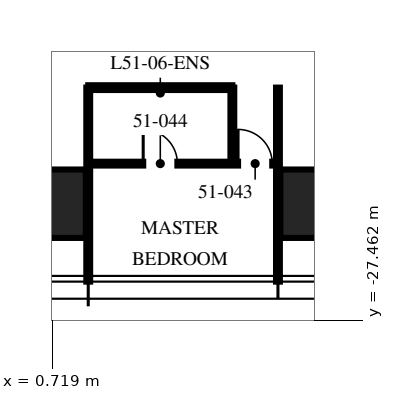
"""IFC4 building model, lengths in metres.
Left out: names, types, materials, properties, quantities, classifications, styles, units other than length and angle.
Written with IfcOpenShell. Run it as: python <this file> out.ifc"""

import sys

from ifc_helpers import new_model, si_unit, direction, frame, frame_2d, origin, origin_2d, place, context, subcontext, project, spatial, rectangle, hollow_rectangle, extrude, element, fill, save


model = new_model("IFC4")
c1 = context("Model", 3, precision=1e-05, world=origin(), true_north=direction((0.0, 1.0)))
c2 = subcontext(c1, "Body", "Model", "MODEL_VIEW")
j1 = project(units=[si_unit("LENGTHUNIT", "METRE"), si_unit("PLANEANGLEUNIT", "RADIAN")], contexts=[c1])
p1 = place(None, origin())
s1 = spatial("IfcSite", under=j1, at=p1, CompositionType="ELEMENT")
p2 = place(p1, origin())
s2 = spatial("IfcBuilding", under=s1, at=p2, CompositionType="ELEMENT")
p3 = place(p2, frame((0.0, 0.0, 207.0)))
s3 = spatial("IfcBuildingStorey", under=s2, at=p3, CompositionType="ELEMENT", Elevation=207.0)
for number, where, z_axis, x_axis in (
    (1, (8.32, -24.4, 0.0), (0.0, 0.0, 1.0), (1.0, 0.0, 0.0)),
    (2, (0.0, -24.4, 0.0), (0.0, 0.0, 1.0), (1.0, 0.0, 0.0)),
):
    element("IfcColumn", number, at=place(p3, frame(where, z_axis=z_axis, x_axis=x_axis)), inside=s3, PredefinedType="COLUMN", context=c2, shape_type="SweptSolid", body=[
        extrude(hollow_rectangle(XDim=3.2, YDim=1.8, WallThickness=0.2, at=origin_2d()), origin(), (0.0, 0.0, 1.0), 3.75),
    ])
for number, where, z_axis, x_axis in (
    (3, (1.664, -21.345, 0.0), (0.0, 0.0, 1.0), (0.0, -1.0, 0.0)),
    (4, (6.656, -21.345, 0.0), (0.0, 0.0, 1.0), (0.0, -1.0, 0.0)),
):
    element("IfcWall", number, at=place(p3, frame(where, z_axis=z_axis, x_axis=x_axis)), inside=s3, PredefinedType="PARTITIONING", context=c2, shape_type="SweptSolid", body=[
        extrude(rectangle(XDim=5.105, YDim=0.1, at=frame_2d((2.552, 0.0))), origin(), (0.0, 0.0, 1.0), 2.91),
    ])
p4 = place(p3, frame((1.664, -23.345, 0.0), z_axis=(0.0, 0.0, 1.0), x_axis=(1.0, 0.0, 0.0)))
e5 = element("IfcWall", 5, at=p4, inside=s3, PredefinedType="PARTITIONING", context=c2, shape_type="SweptSolid", body=[
    extrude(rectangle(XDim=4.992, YDim=0.1, at=frame_2d((2.496, 0.0))), origin(), (0.0, 0.0, 1.0), 2.81),
])
p5 = place(p4, frame((3.942, 0.0, 0.0)))
e6 = element("IfcOpeningElement", 6, at=p5, cuts=e5, PredefinedType="OPENING", context=c2, shape_type="SweptSolid", body=[
    extrude(rectangle(XDim=0.9, YDim=2.1, at=frame_2d((0.45, 1.05))), frame((0.0, 0.06, 0.0), z_axis=(0.0, -1.0, 0.0), x_axis=(1.0, 0.0, 0.0)), (0.0, 0.0, 1.0), 0.12),
])
p6 = place(p4, frame((1.446, 0.0, 0.0)))
e7 = element("IfcOpeningElement", 7, at=p6, cuts=e5, PredefinedType="OPENING", context=c2, shape_type="SweptSolid", body=[
    extrude(rectangle(XDim=0.9, YDim=2.1, at=frame_2d((0.45, 1.05))), frame((0.0, 0.06, 0.0), z_axis=(0.0, -1.0, 0.0), x_axis=(1.0, 0.0, 0.0)), (0.0, 0.0, 1.0), 0.12),
])
p7 = place(p3, frame((5.456, -21.345, 0.0), z_axis=(0.0, 0.0, 1.0), x_axis=(0.0, -1.0, 0.0)))
e8 = element("IfcWall", 8, at=p7, inside=s3, PredefinedType="PARTITIONING", context=c2, shape_type="SweptSolid", body=[
    extrude(rectangle(XDim=2.0, YDim=0.1, at=frame_2d((1.0, 0.0))), origin(), (0.0, 0.0, 1.0), 3.5),
])
p8 = place(p3, frame((1.664, -21.345, 0.0), z_axis=(0.0, 0.0, 1.0), x_axis=(1.0, 0.0, 0.0)))
e9 = element("IfcWall", 9, at=p8, inside=s3, PredefinedType="PARTITIONING", context=c2, shape_type="SweptSolid", body=[
    extrude(rectangle(XDim=3.792, YDim=0.125, at=frame_2d((1.896, 0.0))), origin(), (0.0, 0.0, 1.0), 2.81),
])
p9 = place(p5, origin())
e10 = element("IfcDoor", 10, at=p9, inside=s3, OperationType="SINGLE_SWING_LEFT", PredefinedType="DOOR", context=c2, shape_type="SweptSolid", body=[
    extrude(rectangle(XDim=0.9, YDim=2.1, at=frame_2d((0.45, 1.05))), frame((0.0, 0.025, 0.0), z_axis=(0.0, -1.0, 0.0), x_axis=(1.0, 0.0, 0.0)), (0.0, 0.0, 1.0), 0.05),
])
fill(e6, e10)
p10 = place(p6, origin())
e11 = element("IfcDoor", 11, at=p10, inside=s3, OperationType="SINGLE_SWING_LEFT", PredefinedType="DOOR", context=c2, shape_type="SweptSolid", body=[
    extrude(rectangle(XDim=0.9, YDim=2.1, at=frame_2d((0.45, 1.05))), frame((0.0, 0.025, 0.0), z_axis=(0.0, -1.0, 0.0), x_axis=(1.0, 0.0, 0.0)), (0.0, 0.0, 1.0), 0.05),
])
fill(e7, e11)
save(model, sys.argv[1])
